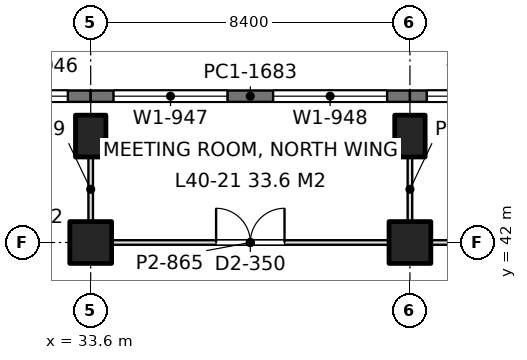
"""IFC4 building model, lengths in metres.
Left out: names, types, materials, properties, quantities, classifications, styles, units other than length and angle.
Written with IfcOpenShell. Run it as: python <this file> out.ifc"""

import sys

from ifc_helpers import new_model, si_unit, direction, frame, frame_2d, origin, origin_2d, place, context, subcontext, project, spatial, rectangle, extrude, element, fill, save


model = new_model("IFC4")
c1 = context("Model", 3, precision=1e-05, world=origin(), true_north=direction((0.0, 1.0)))
c2 = subcontext(c1, "Body", "Model", "MODEL_VIEW")
j1 = project(units=[si_unit("LENGTHUNIT", "METRE"), si_unit("PLANEANGLEUNIT", "RADIAN")], contexts=[c1])
p1 = place(None, origin())
s1 = spatial("IfcSite", under=j1, at=p1, CompositionType="ELEMENT")
p2 = place(p1, origin())
s2 = spatial("IfcBuilding", under=s1, at=p2, CompositionType="ELEMENT")
p3 = place(p2, frame((0.0, 0.0, 177.6)))
s3 = spatial("IfcBuildingStorey", under=s2, at=p3, CompositionType="ELEMENT", Elevation=177.6)
p4 = place(p3, frame((33.6, 42.0, 0.0), z_axis=(0.0, 0.0, 1.0), x_axis=(1.0, 0.0, 0.0)))
e1 = element("IfcColumn", 1, at=p4, inside=s3, PredefinedType="COLUMN", context=c2, shape_type="SweptSolid", body=[
    extrude(rectangle(XDim=1.1, YDim=1.1, at=origin_2d()), origin(), (0.0, 0.0, 1.0), 4.2),
])
p5 = place(p3, frame((33.6, 44.8, 0.0), z_axis=(0.0, 0.0, 1.0), x_axis=(1.0, 0.0, 0.0)))
e2 = element("IfcColumn", 2, at=p5, inside=s3, PredefinedType="COLUMN", context=c2, shape_type="SweptSolid", body=[
    extrude(rectangle(XDim=0.8, YDim=1.1, at=origin_2d()), origin(), (0.0, 0.0, 1.0), 4.2),
])
p6 = place(p3, frame((42.0, 42.0, 0.0), z_axis=(0.0, 0.0, 1.0), x_axis=(1.0, 0.0, 0.0)))
e3 = element("IfcColumn", 3, at=p6, inside=s3, PredefinedType="COLUMN", context=c2, shape_type="SweptSolid", body=[
    extrude(rectangle(XDim=1.1, YDim=1.1, at=origin_2d()), origin(), (0.0, 0.0, 1.0), 4.2),
])
p7 = place(p3, frame((42.0, 44.8, 0.0), z_axis=(0.0, 0.0, 1.0), x_axis=(1.0, 0.0, 0.0)))
e4 = element("IfcColumn", 4, at=p7, inside=s3, PredefinedType="COLUMN", context=c2, shape_type="SweptSolid", body=[
    extrude(rectangle(XDim=0.8, YDim=1.1, at=origin_2d()), origin(), (0.0, 0.0, 1.0), 4.2),
])
p8 = place(p3, frame((25.2, 45.85, 0.0), z_axis=(0.0, 0.0, 1.0), x_axis=(1.0, 0.0, 0.0)))
e5 = element("IfcWall", 5, at=p8, inside=s3, PredefinedType="SOLIDWALL", context=c2, shape_type="SweptSolid", body=[
    extrude(rectangle(XDim=8.4, YDim=0.3, at=frame_2d((4.2, 0.0))), origin(), (0.0, 0.0, 1.0), 4.05),
])
p9 = place(p8, frame((0.6, 0.0, 0.9)))
e6 = element("IfcOpeningElement", 6, at=p9, cuts=e5, PredefinedType="OPENING", context=c2, shape_type="SweptSolid", body=[
    extrude(rectangle(XDim=3.0, YDim=1.9, at=frame_2d((1.5, 0.95))), frame((0.0, 0.16, 0.0), z_axis=(0.0, -1.0, 0.0), x_axis=(1.0, 0.0, 0.0)), (0.0, 0.0, 1.0), 0.32),
])
p10 = place(p8, frame((4.8, 0.0, 0.9)))
e7 = element("IfcOpeningElement", 7, at=p10, cuts=e5, PredefinedType="OPENING", context=c2, shape_type="SweptSolid", body=[
    extrude(rectangle(XDim=3.0, YDim=1.9, at=frame_2d((1.5, 0.95))), frame((0.0, 0.16, 0.0), z_axis=(0.0, -1.0, 0.0), x_axis=(1.0, 0.0, 0.0)), (0.0, 0.0, 1.0), 0.32),
])
p11 = place(p3, frame((33.6, 45.85, 0.0), z_axis=(0.0, 0.0, 1.0), x_axis=(1.0, 0.0, 0.0)))
e8 = element("IfcWall", 8, at=p11, inside=s3, PredefinedType="SOLIDWALL", context=c2, shape_type="SweptSolid", body=[
    extrude(rectangle(XDim=8.4, YDim=0.3, at=frame_2d((4.2, 0.0))), origin(), (0.0, 0.0, 1.0), 4.05),
])
p12 = place(p11, frame((0.6, 0.0, 0.9)))
e9 = element("IfcOpeningElement", 9, at=p12, cuts=e8, PredefinedType="OPENING", context=c2, shape_type="SweptSolid", body=[
    extrude(rectangle(XDim=3.0, YDim=1.9, at=frame_2d((1.5, 0.95))), frame((0.0, 0.16, 0.0), z_axis=(0.0, -1.0, 0.0), x_axis=(1.0, 0.0, 0.0)), (0.0, 0.0, 1.0), 0.32),
])
p13 = place(p11, frame((4.8, 0.0, 0.9)))
e10 = element("IfcOpeningElement", 10, at=p13, cuts=e8, PredefinedType="OPENING", context=c2, shape_type="SweptSolid", body=[
    extrude(rectangle(XDim=3.0, YDim=1.9, at=frame_2d((1.5, 0.95))), frame((0.0, 0.16, 0.0), z_axis=(0.0, -1.0, 0.0), x_axis=(1.0, 0.0, 0.0)), (0.0, 0.0, 1.0), 0.32),
])
p14 = place(p3, frame((42.0, 45.85, 0.0), z_axis=(0.0, 0.0, 1.0), x_axis=(1.0, 0.0, 0.0)))
e11 = element("IfcWall", 11, at=p14, inside=s3, PredefinedType="SOLIDWALL", context=c2, shape_type="SweptSolid", body=[
    extrude(rectangle(XDim=8.085, YDim=0.3, at=frame_2d((4.042, 0.0))), origin(), (0.0, 0.0, 1.0), 4.05),
])
p15 = place(p14, frame((0.443, 0.0, 0.9)))
e12 = element("IfcOpeningElement", 12, at=p15, cuts=e11, PredefinedType="OPENING", context=c2, shape_type="SweptSolid", body=[
    extrude(rectangle(XDim=3.0, YDim=1.9, at=frame_2d((1.5, 0.95))), frame((0.0, 0.16, 0.0), z_axis=(0.0, -1.0, 0.0), x_axis=(1.0, 0.0, 0.0)), (0.0, 0.0, 1.0), 0.32),
])
p16 = place(p14, frame((4.643, 0.0, 0.9)))
e13 = element("IfcOpeningElement", 13, at=p16, cuts=e11, PredefinedType="OPENING", context=c2, shape_type="SweptSolid", body=[
    extrude(rectangle(XDim=3.0, YDim=1.9, at=frame_2d((1.5, 0.95))), frame((0.0, 0.16, 0.0), z_axis=(0.0, -1.0, 0.0), x_axis=(1.0, 0.0, 0.0)), (0.0, 0.0, 1.0), 0.32),
])
p17 = place(p3, frame((34.149, 42.0, 0.0), z_axis=(0.0, 0.0, 1.0), x_axis=(1.0, 0.0, 0.0)))
e14 = element("IfcWall", 14, at=p17, inside=s3, PredefinedType="PARTITIONING", context=c2, shape_type="SweptSolid", body=[
    extrude(rectangle(XDim=7.302, YDim=0.12, at=frame_2d((3.651, 0.0))), origin(), (0.0, 0.0, 1.0), 3.55),
])
p18 = place(p17, frame((2.751, 0.0, 0.0)))
e15 = element("IfcOpeningElement", 15, at=p18, cuts=e14, PredefinedType="OPENING", context=c2, shape_type="SweptSolid", body=[
    extrude(rectangle(XDim=1.8, YDim=2.2, at=frame_2d((0.9, 1.1))), frame((0.0, 0.07, 0.0), z_axis=(0.0, -1.0, 0.0), x_axis=(1.0, 0.0, 0.0)), (0.0, 0.0, 1.0), 0.14),
])
p19 = place(p3, frame((42.549, 42.0, 0.0), z_axis=(0.0, 0.0, 1.0), x_axis=(1.0, 0.0, 0.0)))
e16 = element("IfcWall", 16, at=p19, inside=s3, PredefinedType="PARTITIONING", context=c2, shape_type="SweptSolid", body=[
    extrude(rectangle(XDim=7.302, YDim=0.12, at=frame_2d((3.651, 0.0))), origin(), (0.0, 0.0, 1.0), 3.55),
])
p20 = place(p19, frame((1.051, 0.0, 0.0)))
e17 = element("IfcOpeningElement", 17, at=p20, cuts=e16, PredefinedType="OPENING", context=c2, shape_type="SweptSolid", body=[
    extrude(rectangle(XDim=1.0, YDim=2.4, at=frame_2d((0.5, 1.2))), frame((0.0, 0.07, 0.0), z_axis=(0.0, -1.0, 0.0), x_axis=(1.0, 0.0, 0.0)), (0.0, 0.0, 1.0), 0.14),
])
p21 = place(p19, frame((5.701, 0.0, 0.0)))
e18 = element("IfcOpeningElement", 18, at=p21, cuts=e16, PredefinedType="OPENING", context=c2, shape_type="SweptSolid", body=[
    extrude(rectangle(XDim=1.0, YDim=2.4, at=frame_2d((0.5, 1.2))), frame((0.0, 0.07, 0.0), z_axis=(0.0, -1.0, 0.0), x_axis=(1.0, 0.0, 0.0)), (0.0, 0.0, 1.0), 0.14),
])
for number, where, z_axis, x_axis in (
    (19, (33.6, 42.549, 0.0), (0.0, 0.0, 1.0), (0.0, 1.0, 0.0)),
    (20, (42.0, 42.549, 0.0), (0.0, 0.0, 1.0), (0.0, 1.0, 0.0)),
):
    element("IfcWall", number, at=place(p3, frame(where, z_axis=z_axis, x_axis=x_axis)), inside=s3, PredefinedType="PARTITIONING", context=c2, shape_type="SweptSolid", body=[
        extrude(rectangle(XDim=1.702, YDim=0.12, at=frame_2d((0.851, 0.0))), origin(), (0.0, 0.0, 1.0), 3.69),
    ])
p22 = place(p10, origin())
e21 = element("IfcWindow", 21, at=p22, inside=s3, PartitioningType="SINGLE_PANEL", PredefinedType="WINDOW", context=c2, shape_type="SweptSolid", body=[
    extrude(rectangle(XDim=3.0, YDim=1.9, at=frame_2d((1.5, 0.95))), frame((0.0, 0.03, 0.0), z_axis=(0.0, -1.0, 0.0), x_axis=(1.0, 0.0, 0.0)), (0.0, 0.0, 1.0), 0.06),
])
fill(e7, e21)
p23 = place(p12, origin())
e22 = element("IfcWindow", 22, at=p23, inside=s3, PartitioningType="SINGLE_PANEL", PredefinedType="WINDOW", context=c2, shape_type="SweptSolid", body=[
    extrude(rectangle(XDim=3.0, YDim=1.9, at=frame_2d((1.5, 0.95))), frame((0.0, 0.03, 0.0), z_axis=(0.0, -1.0, 0.0), x_axis=(1.0, 0.0, 0.0)), (0.0, 0.0, 1.0), 0.06),
])
fill(e9, e22)
p24 = place(p13, origin())
e23 = element("IfcWindow", 23, at=p24, inside=s3, PartitioningType="SINGLE_PANEL", PredefinedType="WINDOW", context=c2, shape_type="SweptSolid", body=[
    extrude(rectangle(XDim=3.0, YDim=1.9, at=frame_2d((1.5, 0.95))), frame((0.0, 0.03, 0.0), z_axis=(0.0, -1.0, 0.0), x_axis=(1.0, 0.0, 0.0)), (0.0, 0.0, 1.0), 0.06),
])
fill(e10, e23)
p25 = place(p15, origin())
e24 = element("IfcWindow", 24, at=p25, inside=s3, PartitioningType="SINGLE_PANEL", PredefinedType="WINDOW", context=c2, shape_type="SweptSolid", body=[
    extrude(rectangle(XDim=3.0, YDim=1.9, at=frame_2d((1.5, 0.95))), frame((0.0, 0.03, 0.0), z_axis=(0.0, -1.0, 0.0), x_axis=(1.0, 0.0, 0.0)), (0.0, 0.0, 1.0), 0.06),
])
fill(e12, e24)
p26 = place(p18, origin())
e25 = element("IfcDoor", 25, at=p26, inside=s3, OperationType="DOUBLE_DOOR_SINGLE_SWING", PredefinedType="DOOR", context=c2, shape_type="SweptSolid", body=[
    extrude(rectangle(XDim=1.8, YDim=2.2, at=frame_2d((0.9, 1.1))), frame((0.0, 0.025, 0.0), z_axis=(0.0, -1.0, 0.0), x_axis=(1.0, 0.0, 0.0)), (0.0, 0.0, 1.0), 0.05),
])
fill(e15, e25)
save(model, sys.argv[1])
